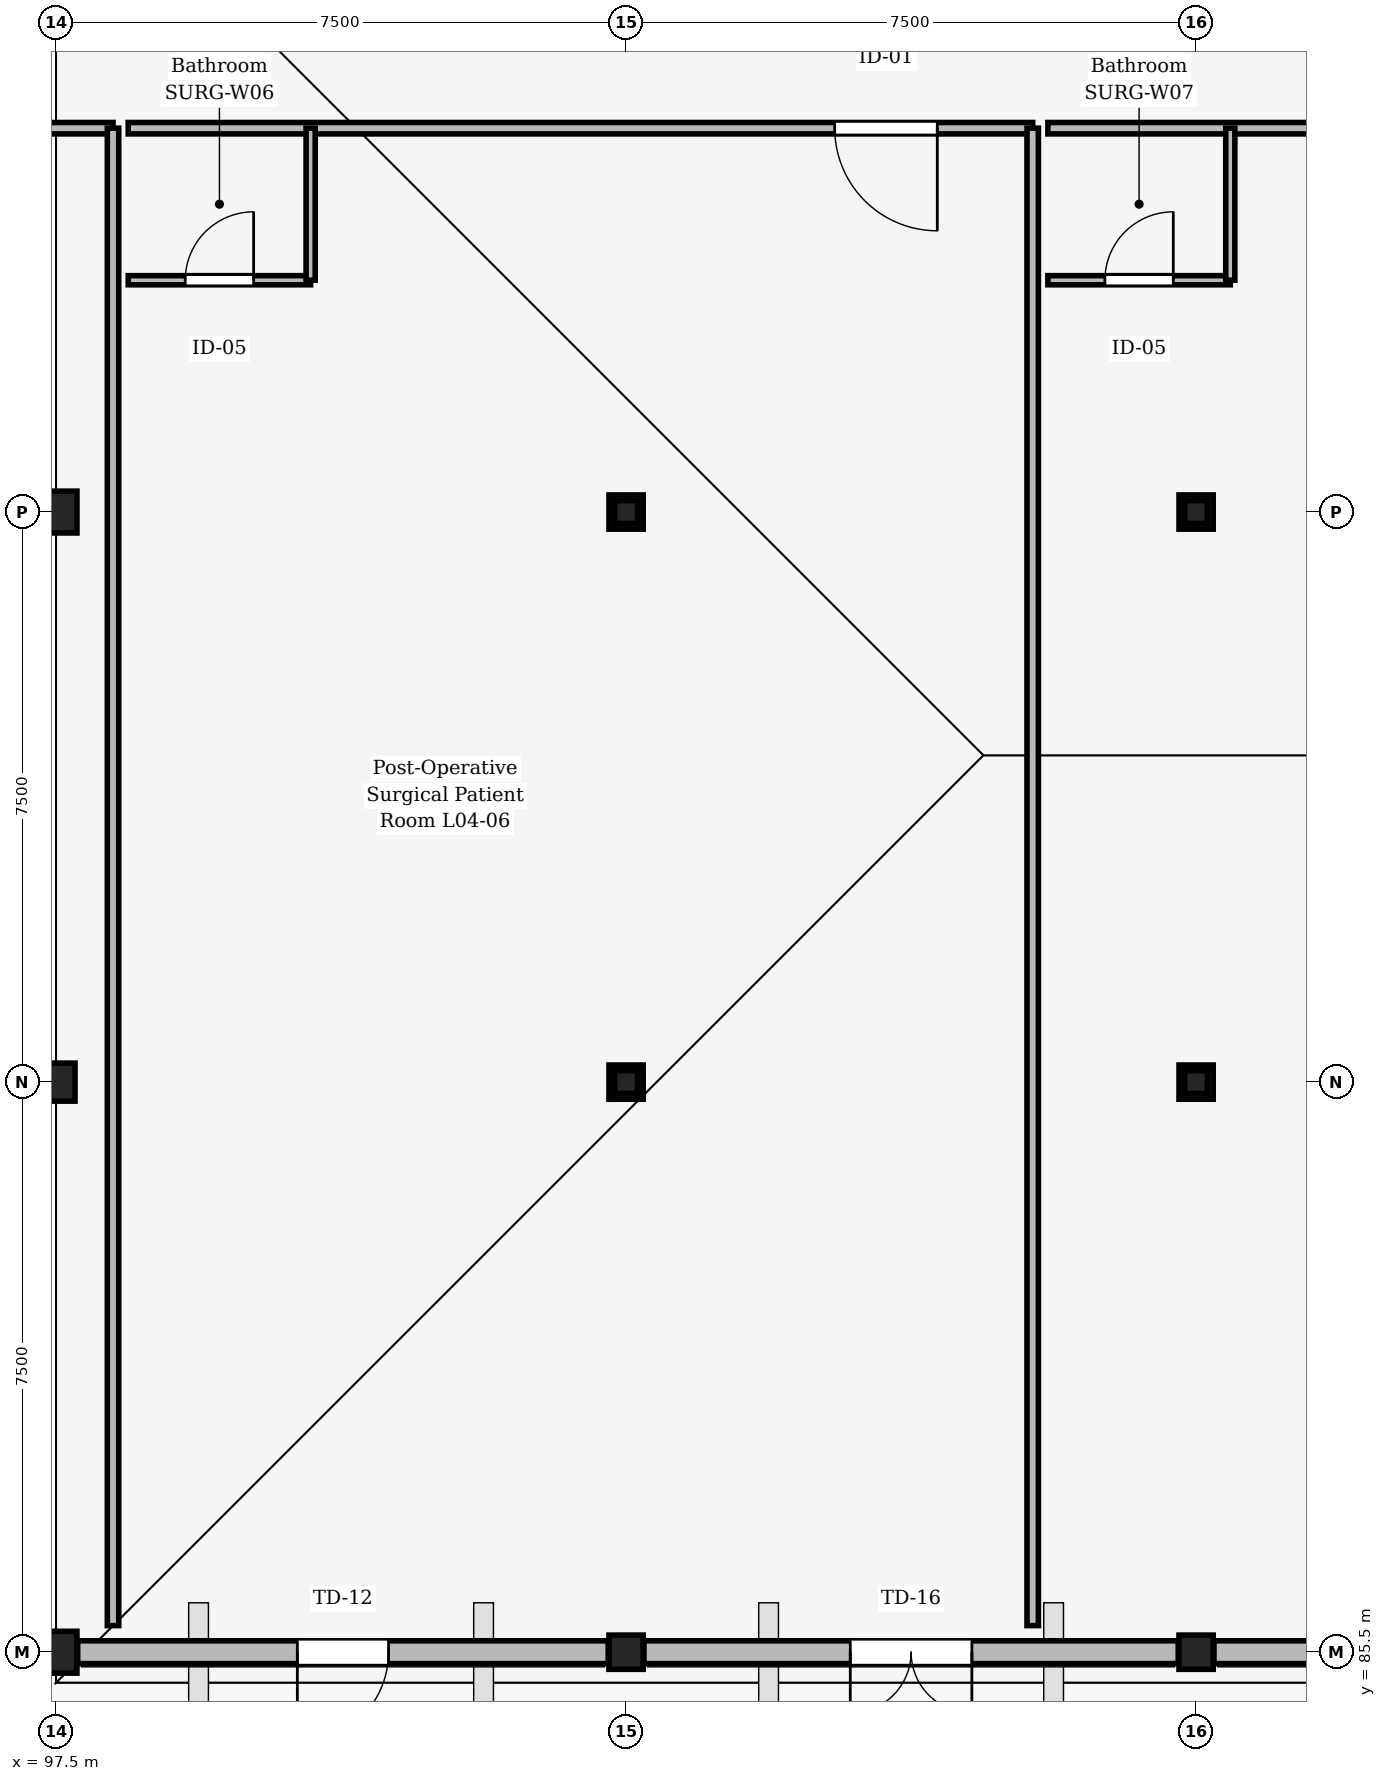
"""IFC4 building model, lengths in metres.
Left out: names, types, materials, properties, quantities, classifications, styles, units other than length and angle.
Written with IfcOpenShell. Run it as: python <this file> out.ifc"""

import sys

from ifc_helpers import new_model, si_unit, direction, frame, frame_2d, origin, origin_2d, place, context, subcontext, project, spatial, rectangle, i_section, extrude, element, fill, save


model = new_model("IFC4")
c1 = context("Model", 3, precision=1e-05, world=origin(), true_north=direction((0.0, 1.0)))
c2 = subcontext(c1, "Body", "Model", "MODEL_VIEW")
j1 = project(units=[si_unit("LENGTHUNIT", "METRE"), si_unit("PLANEANGLEUNIT", "RADIAN")], contexts=[c1])
p1 = place(None, origin())
s1 = spatial("IfcSite", under=j1, at=p1, CompositionType="ELEMENT")
p2 = place(p1, origin())
s2 = spatial("IfcBuilding", under=s1, at=p2, CompositionType="ELEMENT")
p3 = place(p2, frame((0.0, 0.0, 17.85)))
s3 = spatial("IfcBuildingStorey", under=s2, at=p3, CompositionType="ELEMENT", Elevation=17.85)
p4 = place(p3, frame((97.5, 85.5, 0.0), z_axis=(0.0, 0.0, 1.0), x_axis=(1.0, 0.0, 0.0)))
e1 = element("IfcColumn", 1, at=p4, inside=s3, PredefinedType="COLUMN", context=c2, shape_type="SweptSolid", body=[
    extrude(rectangle(XDim=0.55, YDim=0.55, at=origin_2d()), origin(), (0.0, 0.0, 1.0), 4.05),
])
p5 = place(p3, frame((97.5, 93.0, 0.0), z_axis=(0.0, 0.0, 1.0), x_axis=(1.0, 0.0, 0.0)))
e2 = element("IfcColumn", 2, at=p5, inside=s3, PredefinedType="COLUMN", context=c2, shape_type="SweptSolid", body=[
    extrude(rectangle(XDim=0.5, YDim=0.5, at=origin_2d()), origin(), (0.0, 0.0, 1.0), 4.05),
])
p6 = place(p3, frame((97.5, 100.5, 0.0), z_axis=(0.0, 0.0, 1.0), x_axis=(1.0, 0.0, 0.0)))
e3 = element("IfcColumn", 3, at=p6, inside=s3, PredefinedType="COLUMN", context=c2, shape_type="SweptSolid", body=[
    extrude(rectangle(XDim=0.55, YDim=0.55, at=origin_2d()), origin(), (0.0, 0.0, 1.0), 4.05),
])
for number, where, z_axis, x_axis in (
    (4, (105.0, 85.5, 0.0), (0.0, 0.0, 1.0), (1.0, 0.0, 0.0)),
    (5, (105.0, 93.0, 0.0), (0.0, 0.0, 1.0), (1.0, 0.0, 0.0)),
    (6, (105.0, 100.5, 0.0), (0.0, 0.0, 1.0), (1.0, 0.0, 0.0)),
    (7, (112.5, 85.5, 0.0), (0.0, 0.0, 1.0), (1.0, 0.0, 0.0)),
    (8, (112.5, 93.0, 0.0), (0.0, 0.0, 1.0), (1.0, 0.0, 0.0)),
    (9, (112.5, 100.5, 0.0), (0.0, 0.0, 1.0), (1.0, 0.0, 0.0)),
):
    element("IfcColumn", number, at=place(p3, frame(where, z_axis=z_axis, x_axis=x_axis)), inside=s3, PredefinedType="COLUMN", context=c2, shape_type="SweptSolid", body=[
        extrude(rectangle(XDim=0.45, YDim=0.45, at=origin_2d()), origin(), (0.0, 0.0, 1.0), 4.05),
    ])
for number, where, z_axis, x_axis in (
    (10, (105.0, 93.0, 4.05), (0.0, 0.0, 1.0), (1.0, 0.0, 0.0)),
    (11, (105.0, 100.5, 4.05), (0.0, 0.0, 1.0), (1.0, 0.0, 0.0)),
):
    element("IfcColumn", number, at=place(p3, frame(where, z_axis=z_axis, x_axis=x_axis)), inside=s3, PredefinedType="COLUMN", context=c2, shape_type="SweptSolid", body=[
        extrude(i_section(OverallWidth=0.3, OverallDepth=0.3, WebThickness=0.011, FlangeThickness=0.019, FilletRadius=0.027, at=origin_2d()), origin(), (0.0, 0.0, 1.0), 1.872),
    ])
p7 = place(p3, frame((112.5, 93.0, 4.05), z_axis=(0.0, 0.0, 1.0), x_axis=(1.0, 0.0, 0.0)))
e12 = element("IfcColumn", 12, at=p7, inside=s3, PredefinedType="COLUMN", context=c2, shape_type="SweptSolid", body=[
    extrude(i_section(OverallWidth=0.3, OverallDepth=0.3, WebThickness=0.011, FlangeThickness=0.019, FilletRadius=0.027, at=origin_2d()), origin(), (0.0, 0.0, 1.0), 1.97),
])
p8 = place(p3, frame((112.5, 100.5, 4.05), z_axis=(0.0, 0.0, 1.0), x_axis=(1.0, 0.0, 0.0)))
e13 = element("IfcColumn", 13, at=p8, inside=s3, PredefinedType="COLUMN", context=c2, shape_type="SweptSolid", body=[
    extrude(i_section(OverallWidth=0.3, OverallDepth=0.3, WebThickness=0.011, FlangeThickness=0.019, FilletRadius=0.027, at=origin_2d()), origin(), (0.0, 0.0, 1.0), 2.24),
])
p9 = place(p3, frame((104.765, 85.5, 0.0), z_axis=(0.0, 0.0, 1.0), x_axis=(-1.0, 0.0, 0.0)))
e14 = element("IfcWall", 14, at=p9, inside=s3, PredefinedType="STANDARD", context=c2, shape_type="SweptSolid", body=[
    extrude(rectangle(XDim=6.98, YDim=0.3, at=frame_2d((3.49, 0.0))), origin(), (0.0, 0.0, 1.0), 3.77),
])
p10 = place(p9, frame((2.89, 0.0, 0.0)))
e15 = element("IfcOpeningElement", 15, at=p10, cuts=e14, PredefinedType="OPENING", context=c2, shape_type="SweptSolid", body=[
    extrude(rectangle(XDim=1.2, YDim=2.3, at=frame_2d((0.6, 1.15))), frame((0.0, 0.16, 0.0), z_axis=(0.0, -1.0, 0.0), x_axis=(1.0, 0.0, 0.0)), (0.0, 0.0, 1.0), 0.32),
])
p11 = place(p3, frame((112.265, 85.5, 0.0), z_axis=(0.0, 0.0, 1.0), x_axis=(-1.0, 0.0, 0.0)))
e16 = element("IfcWall", 16, at=p11, inside=s3, PredefinedType="STANDARD", context=c2, shape_type="SweptSolid", body=[
    extrude(rectangle(XDim=7.03, YDim=0.3, at=frame_2d((3.515, 0.0))), origin(), (0.0, 0.0, 1.0), 3.77),
])
p12 = place(p11, frame((2.715, 0.0, 0.0)))
e17 = element("IfcOpeningElement", 17, at=p12, cuts=e16, PredefinedType="OPENING", context=c2, shape_type="SweptSolid", body=[
    extrude(rectangle(XDim=1.6, YDim=2.35, at=frame_2d((0.8, 1.175))), frame((0.0, 0.16, 0.0), z_axis=(0.0, -1.0, 0.0), x_axis=(1.0, 0.0, 0.0)), (0.0, 0.0, 1.0), 0.32),
])
p13 = place(p3, frame((119.765, 85.5, 0.0), z_axis=(0.0, 0.0, 1.0), x_axis=(-1.0, 0.0, 0.0)))
e18 = element("IfcWall", 18, at=p13, inside=s3, PredefinedType="STANDARD", context=c2, shape_type="SweptSolid", body=[
    extrude(rectangle(XDim=7.03, YDim=0.3, at=frame_2d((3.515, 0.0))), origin(), (0.0, 0.0, 1.0), 3.77),
])
p14 = place(p13, frame((2.915, 0.0, 0.0)))
e19 = element("IfcOpeningElement", 19, at=p14, cuts=e18, PredefinedType="OPENING", context=c2, shape_type="SweptSolid", body=[
    extrude(rectangle(XDim=1.2, YDim=2.3, at=frame_2d((0.6, 1.15))), frame((0.0, 0.16, 0.0), z_axis=(0.0, -1.0, 0.0), x_axis=(1.0, 0.0, 0.0)), (0.0, 0.0, 1.0), 0.32),
])
p15 = place(p3, frame((98.25, 105.55, 0.0), z_axis=(0.0, 0.0, 1.0), x_axis=(-1.0, 0.0, 0.0)))
e20 = element("IfcWall", 20, at=p15, inside=s3, PredefinedType="PARTITIONING", context=c2, shape_type="SweptSolid", body=[
    extrude(rectangle(XDim=11.9, YDim=0.15, at=frame_2d((5.95, 0.0))), origin(), (0.0, 0.0, 1.0), 3.755),
])
p16 = place(p15, frame((4.27, 0.0, 0.0)))
e21 = element("IfcOpeningElement", 21, at=p16, cuts=e20, PredefinedType="OPENING", context=c2, shape_type="SweptSolid", body=[
    extrude(rectangle(XDim=1.35, YDim=2.25, at=frame_2d((0.675, 1.125))), frame((0.0, 0.085, 0.0), z_axis=(0.0, -1.0, 0.0), x_axis=(1.0, 0.0, 0.0)), (0.0, 0.0, 1.0), 0.17),
])
p17 = place(p3, frame((110.35, 105.55, 0.0), z_axis=(0.0, 0.0, 1.0), x_axis=(-1.0, 0.0, 0.0)))
e22 = element("IfcWall", 22, at=p17, inside=s3, PredefinedType="PARTITIONING", context=c2, shape_type="SweptSolid", body=[
    extrude(rectangle(XDim=11.9, YDim=0.15, at=frame_2d((5.95, 0.0))), origin(), (0.0, 0.0, 1.0), 3.755),
])
p18 = place(p17, frame((1.255, 0.0, 0.0)))
e23 = element("IfcOpeningElement", 23, at=p18, cuts=e22, PredefinedType="OPENING", context=c2, shape_type="SweptSolid", body=[
    extrude(rectangle(XDim=1.35, YDim=2.25, at=frame_2d((0.675, 1.125))), frame((0.0, 0.085, 0.0), z_axis=(0.0, -1.0, 0.0), x_axis=(1.0, 0.0, 0.0)), (0.0, 0.0, 1.0), 0.17),
])
p19 = place(p3, frame((98.45, 103.55, 0.0), z_axis=(0.0, 0.0, 1.0), x_axis=(1.0, 0.0, 0.0)))
e24 = element("IfcWall", 24, at=p19, inside=s3, PredefinedType="PARTITIONING", context=c2, shape_type="SweptSolid", body=[
    extrude(rectangle(XDim=2.4, YDim=0.12, at=frame_2d((1.2, 0.0))), origin(), (0.0, 0.0, 1.0), 3.755),
])
p20 = place(p19, frame((0.75, 0.0, 0.0)))
e25 = element("IfcOpeningElement", 25, at=p20, cuts=e24, PredefinedType="OPENING", context=c2, shape_type="SweptSolid", body=[
    extrude(rectangle(XDim=0.9, YDim=2.1, at=frame_2d((0.45, 1.05))), frame((0.0, 0.07, 0.0), z_axis=(0.0, -1.0, 0.0), x_axis=(1.0, 0.0, 0.0)), (0.0, 0.0, 1.0), 0.14),
])
p21 = place(p3, frame((100.85, 103.55, 0.0), z_axis=(0.0, 0.0, 1.0), x_axis=(0.0, 1.0, 0.0)))
e26 = element("IfcWall", 26, at=p21, inside=s3, PredefinedType="PARTITIONING", context=c2, shape_type="SweptSolid", body=[
    extrude(rectangle(XDim=2.0, YDim=0.12, at=frame_2d((1.0, 0.0))), origin(), (0.0, 0.0, 1.0), 3.755),
])
p22 = place(p3, frame((122.45, 105.55, 0.0), z_axis=(0.0, 0.0, 1.0), x_axis=(-1.0, 0.0, 0.0)))
e27 = element("IfcWall", 27, at=p22, inside=s3, PredefinedType="PARTITIONING", context=c2, shape_type="SweptSolid", body=[
    extrude(rectangle(XDim=11.9, YDim=0.15, at=frame_2d((5.95, 0.0))), origin(), (0.0, 0.0, 1.0), 3.755),
])
p23 = place(p22, frame((5.275, 0.0, 0.0)))
e28 = element("IfcOpeningElement", 28, at=p23, cuts=e27, PredefinedType="OPENING", context=c2, shape_type="SweptSolid", body=[
    extrude(rectangle(XDim=1.35, YDim=2.25, at=frame_2d((0.675, 1.125))), frame((0.0, 0.085, 0.0), z_axis=(0.0, -1.0, 0.0), x_axis=(1.0, 0.0, 0.0)), (0.0, 0.0, 1.0), 0.17),
])
p24 = place(p3, frame((110.55, 103.55, 0.0), z_axis=(0.0, 0.0, 1.0), x_axis=(1.0, 0.0, 0.0)))
e29 = element("IfcWall", 29, at=p24, inside=s3, PredefinedType="PARTITIONING", context=c2, shape_type="SweptSolid", body=[
    extrude(rectangle(XDim=2.4, YDim=0.12, at=frame_2d((1.2, 0.0))), origin(), (0.0, 0.0, 1.0), 3.755),
])
p25 = place(p24, frame((0.75, 0.0, 0.0)))
e30 = element("IfcOpeningElement", 30, at=p25, cuts=e29, PredefinedType="OPENING", context=c2, shape_type="SweptSolid", body=[
    extrude(rectangle(XDim=0.9, YDim=2.1, at=frame_2d((0.45, 1.05))), frame((0.0, 0.07, 0.0), z_axis=(0.0, -1.0, 0.0), x_axis=(1.0, 0.0, 0.0)), (0.0, 0.0, 1.0), 0.14),
])
p26 = place(p3, frame((112.95, 103.55, 0.0), z_axis=(0.0, 0.0, 1.0), x_axis=(0.0, 1.0, 0.0)))
e31 = element("IfcWall", 31, at=p26, inside=s3, PredefinedType="PARTITIONING", context=c2, shape_type="SweptSolid", body=[
    extrude(rectangle(XDim=2.0, YDim=0.12, at=frame_2d((1.0, 0.0))), origin(), (0.0, 0.0, 1.0), 3.755),
])
for number, where, z_axis, x_axis in (
    (32, (98.25, 85.85, 0.0), (0.0, 0.0, 1.0), (0.0, 1.0, 0.0)),
    (33, (110.35, 85.85, 0.0), (0.0, 0.0, 1.0), (0.0, 1.0, 0.0)),
):
    element("IfcWall", number, at=place(p3, frame(where, z_axis=z_axis, x_axis=x_axis)), inside=s3, PredefinedType="PARTITIONING", context=c2, shape_type="SweptSolid", body=[
        extrude(rectangle(XDim=19.7, YDim=0.15, at=frame_2d((9.85, 0.0))), origin(), (0.0, 0.0, 1.0), 3.755),
    ])
p27 = place(p10, origin())
e34 = element("IfcDoor", 34, at=p27, inside=s3, OperationType="SINGLE_SWING_RIGHT", PredefinedType="DOOR", context=c2, shape_type="SweptSolid", body=[
    extrude(rectangle(XDim=1.2, YDim=2.3, at=frame_2d((0.6, 1.15))), frame((0.0, 0.025, 0.0), z_axis=(0.0, -1.0, 0.0), x_axis=(1.0, 0.0, 0.0)), (0.0, 0.0, 1.0), 0.05),
])
fill(e15, e34)
p28 = place(p12, origin())
e35 = element("IfcDoor", 35, at=p28, inside=s3, OperationType="DOUBLE_DOOR_SINGLE_SWING", PredefinedType="DOOR", context=c2, shape_type="SweptSolid", body=[
    extrude(rectangle(XDim=1.6, YDim=2.35, at=frame_2d((0.8, 1.175))), frame((0.0, 0.025, 0.0), z_axis=(0.0, -1.0, 0.0), x_axis=(1.0, 0.0, 0.0)), (0.0, 0.0, 1.0), 0.05),
])
fill(e17, e35)
p29 = place(p18, origin())
e36 = element("IfcDoor", 36, at=p29, inside=s3, OperationType="SINGLE_SWING_LEFT", PredefinedType="DOOR", context=c2, shape_type="SweptSolid", body=[
    extrude(rectangle(XDim=1.35, YDim=2.25, at=frame_2d((0.675, 1.125))), frame((0.0, 0.025, 0.0), z_axis=(0.0, -1.0, 0.0), x_axis=(1.0, 0.0, 0.0)), (0.0, 0.0, 1.0), 0.05),
])
fill(e23, e36)
p30 = place(p20, origin())
e37 = element("IfcDoor", 37, at=p30, inside=s3, OperationType="SINGLE_SWING_RIGHT", PredefinedType="DOOR", context=c2, shape_type="SweptSolid", body=[
    extrude(rectangle(XDim=0.9, YDim=2.1, at=frame_2d((0.45, 1.05))), frame((0.0, 0.025, 0.0), z_axis=(0.0, -1.0, 0.0), x_axis=(1.0, 0.0, 0.0)), (0.0, 0.0, 1.0), 0.05),
])
fill(e25, e37)
p31 = place(p25, origin())
e38 = element("IfcDoor", 38, at=p31, inside=s3, OperationType="SINGLE_SWING_RIGHT", PredefinedType="DOOR", context=c2, shape_type="SweptSolid", body=[
    extrude(rectangle(XDim=0.9, YDim=2.1, at=frame_2d((0.45, 1.05))), frame((0.0, 0.025, 0.0), z_axis=(0.0, -1.0, 0.0), x_axis=(1.0, 0.0, 0.0)), (0.0, 0.0, 1.0), 0.05),
])
fill(e30, e38)
save(model, sys.argv[1])
